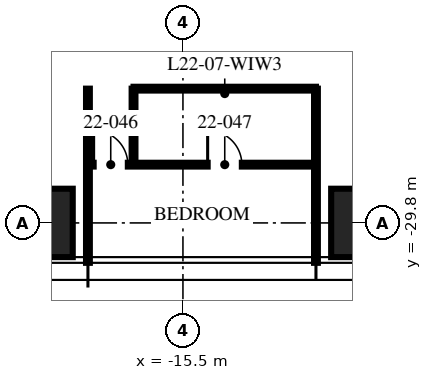
"""IFC4 building model, lengths in metres.
Left out: names, types, materials, properties, quantities, classifications, styles, units other than length and angle.
Written with IfcOpenShell. Run it as: python <this file> out.ifc"""

import sys

from ifc_helpers import new_model, si_unit, direction, frame, frame_2d, origin, origin_2d, place, context, subcontext, project, spatial, rectangle, hollow_rectangle, extrude, element, fill, save


model = new_model("IFC4")
c1 = context("Model", 3, precision=1e-05, world=origin(), true_north=direction((0.0, 1.0)))
c2 = subcontext(c1, "Body", "Model", "MODEL_VIEW")
j1 = project(units=[si_unit("LENGTHUNIT", "METRE"), si_unit("PLANEANGLEUNIT", "RADIAN")], contexts=[c1])
p1 = place(None, origin())
s1 = spatial("IfcSite", under=j1, at=p1, CompositionType="ELEMENT")
p2 = place(p1, origin())
s2 = spatial("IfcBuilding", under=s1, at=p2, CompositionType="ELEMENT")
p3 = place(p2, frame((0.0, 0.0, 88.5)))
s3 = spatial("IfcBuildingStorey", under=s2, at=p3, CompositionType="ELEMENT", Elevation=88.5)
for number, where, z_axis, x_axis in (
    (1, (-10.0, -29.8, 0.0), (0.0, 0.0, 1.0), (1.0, 0.0, 0.0)),
    (2, (-20.0, -29.8, 0.0), (0.0, 0.0, 1.0), (1.0, 0.0, 0.0)),
):
    element("IfcColumn", number, at=place(p3, frame(where, z_axis=z_axis, x_axis=x_axis)), inside=s3, PredefinedType="COLUMN", context=c2, shape_type="SweptSolid", body=[
        extrude(hollow_rectangle(XDim=3.2, YDim=1.8, WallThickness=0.2, at=origin_2d()), origin(), (0.0, 0.0, 1.0), 3.75),
    ])
for number, where, z_axis, x_axis in (
    (3, (-18.0, -26.267, 0.0), (0.0, 0.0, 1.0), (0.0, -1.0, 0.0)),
    (4, (-12.0, -26.267, 0.0), (0.0, 0.0, 1.0), (0.0, -1.0, 0.0)),
):
    element("IfcWall", number, at=place(p3, frame(where, z_axis=z_axis, x_axis=x_axis)), inside=s3, PredefinedType="PARTITIONING", context=c2, shape_type="SweptSolid", body=[
        extrude(rectangle(XDim=4.583, YDim=0.1, at=frame_2d((2.292, 0.0))), origin(), (0.0, 0.0, 1.0), 2.71),
    ])
p4 = place(p3, frame((-18.0, -28.267, 0.0), z_axis=(0.0, 0.0, 1.0), x_axis=(1.0, 0.0, 0.0)))
e5 = element("IfcWall", 5, at=p4, inside=s3, PredefinedType="PARTITIONING", context=c2, shape_type="SweptSolid", body=[
    extrude(rectangle(XDim=6.0, YDim=0.1, at=frame_2d((3.0, 0.0))), origin(), (0.0, 0.0, 1.0), 2.61),
])
p5 = place(p4, frame((0.15, 0.0, 0.0)))
e6 = element("IfcOpeningElement", 6, at=p5, cuts=e5, PredefinedType="OPENING", context=c2, shape_type="SweptSolid", body=[
    extrude(rectangle(XDim=0.9, YDim=2.1, at=frame_2d((0.45, 1.05))), frame((0.0, 0.06, 0.0), z_axis=(0.0, -1.0, 0.0), x_axis=(1.0, 0.0, 0.0)), (0.0, 0.0, 1.0), 0.12),
])
p6 = place(p4, frame((3.15, 0.0, 0.0)))
e7 = element("IfcOpeningElement", 7, at=p6, cuts=e5, PredefinedType="OPENING", context=c2, shape_type="SweptSolid", body=[
    extrude(rectangle(XDim=0.9, YDim=2.1, at=frame_2d((0.45, 1.05))), frame((0.0, 0.06, 0.0), z_axis=(0.0, -1.0, 0.0), x_axis=(1.0, 0.0, 0.0)), (0.0, 0.0, 1.0), 0.12),
])
p7 = place(p3, frame((-16.8, -26.267, 0.0), z_axis=(0.0, 0.0, 1.0), x_axis=(0.0, -1.0, 0.0)))
e8 = element("IfcWall", 8, at=p7, inside=s3, PredefinedType="PARTITIONING", context=c2, shape_type="SweptSolid", body=[
    extrude(rectangle(XDim=2.0, YDim=0.1, at=frame_2d((1.0, 0.0))), origin(), (0.0, 0.0, 1.0), 3.5),
])
p8 = place(p3, frame((-16.8, -26.267, 0.0), z_axis=(0.0, 0.0, 1.0), x_axis=(1.0, 0.0, 0.0)))
e9 = element("IfcWall", 9, at=p8, inside=s3, PredefinedType="PARTITIONING", context=c2, shape_type="SweptSolid", body=[
    extrude(rectangle(XDim=4.8, YDim=0.1, at=frame_2d((2.4, 0.0))), origin(), (0.0, 0.0, 1.0), 2.61),
])
p9 = place(p5, origin())
e10 = element("IfcDoor", 10, at=p9, inside=s3, OperationType="SINGLE_SWING_LEFT", PredefinedType="DOOR", context=c2, shape_type="SweptSolid", body=[
    extrude(rectangle(XDim=0.9, YDim=2.1, at=frame_2d((0.45, 1.05))), frame((0.0, 0.025, 0.0), z_axis=(0.0, -1.0, 0.0), x_axis=(1.0, 0.0, 0.0)), (0.0, 0.0, 1.0), 0.05),
])
fill(e6, e10)
p10 = place(p6, origin())
e11 = element("IfcDoor", 11, at=p10, inside=s3, OperationType="SINGLE_SWING_LEFT", PredefinedType="DOOR", context=c2, shape_type="SweptSolid", body=[
    extrude(rectangle(XDim=0.9, YDim=2.1, at=frame_2d((0.45, 1.05))), frame((0.0, 0.025, 0.0), z_axis=(0.0, -1.0, 0.0), x_axis=(1.0, 0.0, 0.0)), (0.0, 0.0, 1.0), 0.05),
])
fill(e7, e11)
save(model, sys.argv[1])
